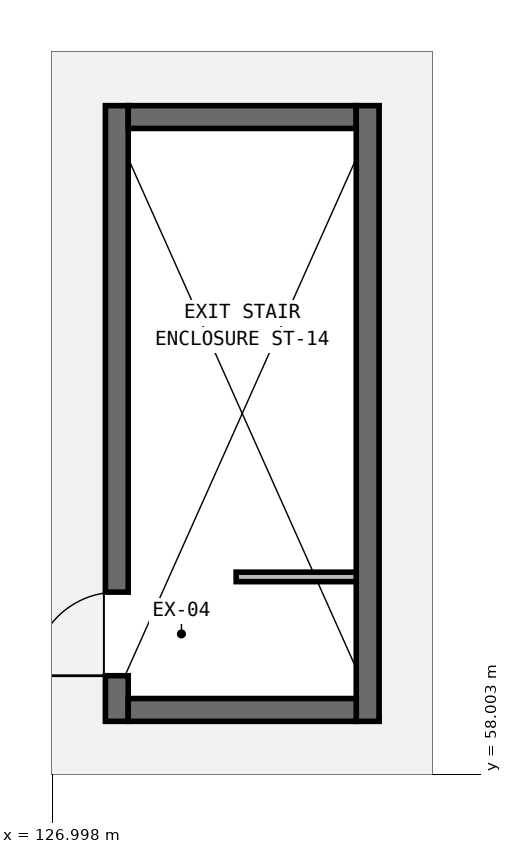
"""IFC4 building model, lengths in metres.
Left out: names, types, materials, properties, quantities, classifications, styles, units other than length and angle.
Written with IfcOpenShell. Run it as: python <this file> out.ifc"""

import sys

from ifc_helpers import new_model, si_unit, direction, frame, frame_2d, origin, place, context, subcontext, project, spatial, rectangle, extrude, element, fill, save


model = new_model("IFC4")
c1 = context("Model", 3, precision=1e-05, world=origin(), true_north=direction((0.0, 1.0)))
c2 = subcontext(c1, "Body", "Model", "MODEL_VIEW")
j1 = project(units=[si_unit("LENGTHUNIT", "METRE"), si_unit("PLANEANGLEUNIT", "RADIAN")], contexts=[c1])
p1 = place(None, origin())
s1 = spatial("IfcSite", under=j1, at=p1, CompositionType="ELEMENT")
p2 = place(p1, origin())
s2 = spatial("IfcBuilding", under=s1, at=p2, CompositionType="ELEMENT")
p3 = place(p2, frame((0.0, 0.0, 23.45)))
s3 = spatial("IfcBuildingStorey", under=s2, at=p3, CompositionType="ELEMENT", Elevation=23.45)
p4 = place(p3, frame((127.85, 58.7, 0.0), z_axis=(0.0, 0.0, 1.0), x_axis=(0.0, 1.0, 0.0)))
e1 = element("IfcWall", 1, at=p4, inside=s3, PredefinedType="SHEAR", context=c2, shape_type="SweptSolid", body=[
    extrude(rectangle(XDim=8.1, YDim=0.3, at=frame_2d((4.05, 0.0))), origin(), (0.0, 0.0, 1.0), 3.2),
])
p5 = place(p4, frame((0.6, 0.0, 0.0)))
e2 = element("IfcOpeningElement", 2, at=p5, cuts=e1, PredefinedType="OPENING", context=c2, shape_type="SweptSolid", body=[
    extrude(rectangle(XDim=1.1, YDim=2.15, at=frame_2d((0.55, 1.075))), frame((0.0, 0.16, 0.0), z_axis=(0.0, -1.0, 0.0), x_axis=(1.0, 0.0, 0.0)), (0.0, 0.0, 1.0), 0.32),
])
p6 = place(p3, frame((128.0, 66.65, 0.0), z_axis=(0.0, 0.0, 1.0), x_axis=(1.0, 0.0, 0.0)))
e3 = element("IfcWall", 3, at=p6, inside=s3, PredefinedType="SHEAR", context=c2, shape_type="SweptSolid", body=[
    extrude(rectangle(XDim=3.0, YDim=0.3, at=frame_2d((1.5, 0.0))), origin(), (0.0, 0.0, 1.0), 3.2),
])
p7 = place(p3, frame((131.15, 66.8, 0.0), z_axis=(0.0, 0.0, 1.0), x_axis=(0.0, -1.0, 0.0)))
e4 = element("IfcWall", 4, at=p7, inside=s3, PredefinedType="SHEAR", context=c2, shape_type="SweptSolid", body=[
    extrude(rectangle(XDim=8.1, YDim=0.3, at=frame_2d((4.05, 0.0))), origin(), (0.0, 0.0, 1.0), 3.2),
])
p8 = place(p3, frame((131.0, 58.85, 0.0), z_axis=(0.0, 0.0, 1.0), x_axis=(-1.0, 0.0, 0.0)))
e5 = element("IfcWall", 5, at=p8, inside=s3, PredefinedType="SHEAR", context=c2, shape_type="SweptSolid", body=[
    extrude(rectangle(XDim=3.0, YDim=0.3, at=frame_2d((1.5, 0.0))), origin(), (0.0, 0.0, 1.0), 3.2),
])
p9 = place(p3, frame((131.0, 60.6, 0.0), z_axis=(0.0, 0.0, 1.0), x_axis=(-1.0, 0.0, 0.0)))
e6 = element("IfcWall", 6, at=p9, inside=s3, PredefinedType="PARTITIONING", context=c2, shape_type="SweptSolid", body=[
    extrude(rectangle(XDim=1.58, YDim=0.125, at=frame_2d((0.79, 0.0))), origin(), (0.0, 0.0, 1.0), 1.15),
])
p10 = place(p5, origin())
e7 = element("IfcDoor", 7, at=p10, inside=s3, OperationType="SINGLE_SWING_LEFT", PredefinedType="DOOR", context=c2, shape_type="SweptSolid", body=[
    extrude(rectangle(XDim=1.1, YDim=2.15, at=frame_2d((0.55, 1.075))), frame((0.0, 0.025, 0.0), z_axis=(0.0, -1.0, 0.0), x_axis=(1.0, 0.0, 0.0)), (0.0, 0.0, 1.0), 0.05),
])
fill(e2, e7)
save(model, sys.argv[1])
